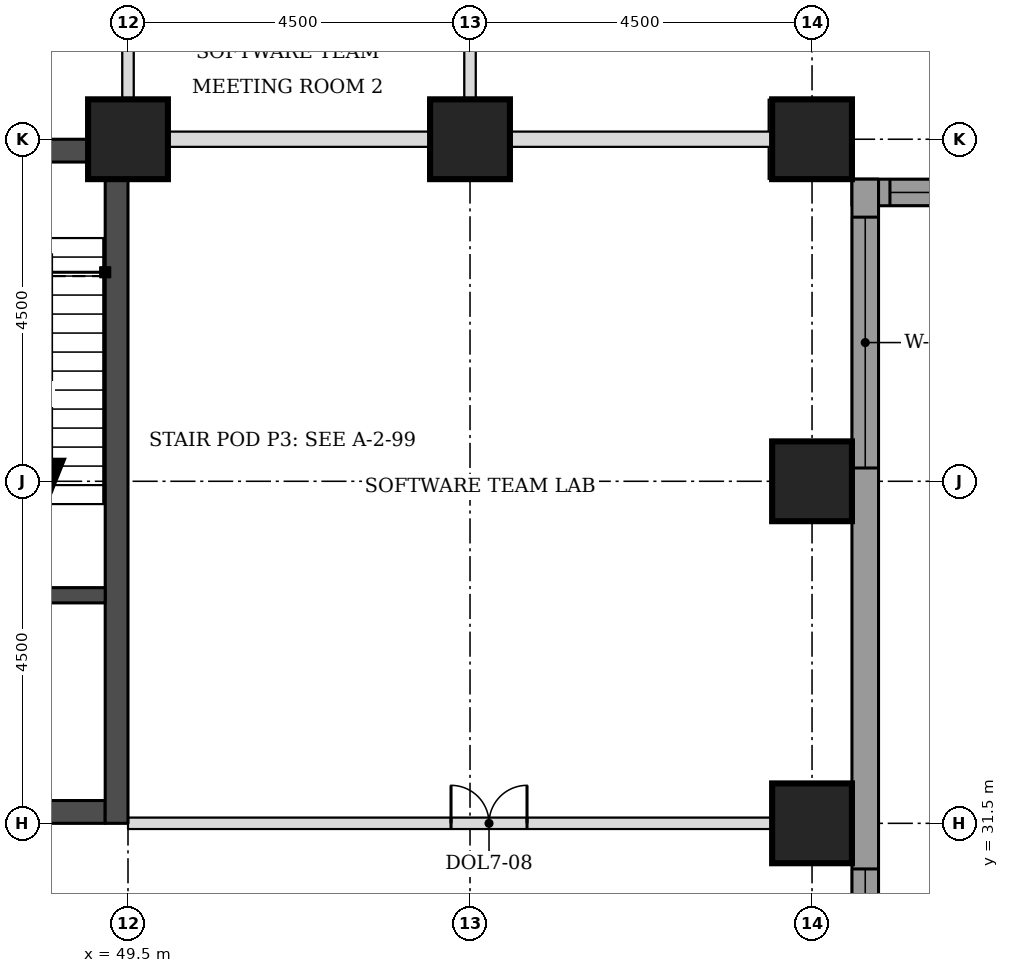
"""IFC4 building model, lengths in metres.
Left out: names, types, materials, properties, quantities, classifications, styles, units other than length and angle.
Written with IfcOpenShell. Run it as: python <this file> out.ifc"""

import sys

from ifc_helpers import new_model, si_unit, direction, frame, frame_2d, origin, origin_2d, place, context, subcontext, project, spatial, rectangle, extrude, element, fill, save


model = new_model("IFC4")
c1 = context("Model", 3, precision=1e-05, world=origin(), true_north=direction((0.0, 1.0)))
c2 = subcontext(c1, "Body", "Model", "MODEL_VIEW")
j1 = project(units=[si_unit("LENGTHUNIT", "METRE"), si_unit("PLANEANGLEUNIT", "RADIAN")], contexts=[c1])
p1 = place(None, origin())
s1 = spatial("IfcSite", under=j1, at=p1, CompositionType="ELEMENT")
p2 = place(p1, origin())
s2 = spatial("IfcBuilding", under=s1, at=p2, CompositionType="ELEMENT")
p3 = place(p2, frame((0.0, 0.0, 130.7)))
s3 = spatial("IfcBuildingStorey", under=s2, at=p3, CompositionType="ELEMENT", Elevation=130.7)
for number, where, z_axis, x_axis in (
    (1, (58.5, 31.5, 0.0), (0.0, 0.0, 1.0), (1.0, 0.0, 0.0)),
    (2, (58.5, 36.0, 0.0), (0.0, 0.0, 1.0), (1.0, 0.0, 0.0)),
    (3, (49.5, 40.5, 0.0), (0.0, 0.0, 1.0), (1.0, 0.0, 0.0)),
    (4, (54.0, 40.5, 0.0), (0.0, 0.0, 1.0), (1.0, 0.0, 0.0)),
    (5, (58.5, 40.5, 0.0), (0.0, 0.0, 1.0), (1.0, 0.0, 0.0)),
):
    element("IfcColumn", number, at=place(p3, frame(where, z_axis=z_axis, x_axis=x_axis)), inside=s3, PredefinedType="COLUMN", context=c2, shape_type="SweptSolid", body=[
        extrude(rectangle(XDim=1.05, YDim=1.05, at=origin_2d()), origin(), (0.0, 0.0, 1.0), 3.7),
    ])
p4 = place(p3, frame((40.8, 31.65, 0.0), z_axis=(0.0, 0.0, 1.0), x_axis=(1.0, 0.0, 0.0)))
e6 = element("IfcWall", 6, at=p4, inside=s3, PredefinedType="SHEAR", context=c2, shape_type="SweptSolid", body=[
    extrude(rectangle(XDim=8.4, YDim=0.3, at=frame_2d((4.2, 0.0))), origin(), (0.0, 0.0, 1.0), 3.7),
])
p5 = place(p4, frame((5.2, 0.0, 0.0)))
e7 = element("IfcOpeningElement", 7, at=p5, cuts=e6, PredefinedType="OPENING", context=c2, shape_type="SweptSolid", body=[
    extrude(rectangle(XDim=1.0, YDim=2.1, at=frame_2d((0.5, 1.05))), frame((0.0, 0.16, 0.0), z_axis=(0.0, -1.0, 0.0), x_axis=(1.0, 0.0, 0.0)), (0.0, 0.0, 1.0), 0.32),
])
p6 = place(p3, frame((40.8, 40.35, 0.0), z_axis=(0.0, 0.0, 1.0), x_axis=(1.0, 0.0, 0.0)))
e8 = element("IfcWall", 8, at=p6, inside=s3, PredefinedType="SHEAR", context=c2, shape_type="SweptSolid", body=[
    extrude(rectangle(XDim=8.4, YDim=0.3, at=frame_2d((4.2, 0.0))), origin(), (0.0, 0.0, 1.0), 3.7),
])
p7 = place(p6, frame((6.4, 0.0, 0.0)))
e9 = element("IfcOpeningElement", 9, at=p7, cuts=e8, PredefinedType="OPENING", context=c2, shape_type="SweptSolid", body=[
    extrude(rectangle(XDim=1.1, YDim=2.1, at=frame_2d((0.55, 1.05))), frame((0.0, 0.16, 0.0), z_axis=(0.0, -1.0, 0.0), x_axis=(1.0, 0.0, 0.0)), (0.0, 0.0, 1.0), 0.32),
])
p8 = place(p3, frame((49.35, 31.5, 0.0), z_axis=(0.0, 0.0, 1.0), x_axis=(0.0, 1.0, 0.0)))
e10 = element("IfcWall", 10, at=p8, inside=s3, PredefinedType="SHEAR", context=c2, shape_type="SweptSolid", body=[
    extrude(rectangle(XDim=9.0, YDim=0.3, at=frame_2d((4.5, 0.0))), origin(), (0.0, 0.0, 1.0), 3.7),
])
p9 = place(p3, frame((59.025, 39.8, 0.0), z_axis=(0.0, 0.0, 1.0), x_axis=(1.0, 0.0, 0.0)))
e11 = element("IfcWall", 11, at=p9, inside=s3, PredefinedType="STANDARD", context=c2, shape_type="SweptSolid", body=[
    extrude(rectangle(XDim=13.337, YDim=0.35, at=frame_2d((6.669, 0.0))), origin(), (0.0, 0.0, 1.0), 3.525),
])
p10 = place(p9, frame((0.5, 0.0, 0.9)))
e12 = element("IfcOpeningElement", 12, at=p10, cuts=e11, PredefinedType="OPENING", context=c2, shape_type="SweptSolid", body=[
    extrude(rectangle(XDim=3.3, YDim=1.9, at=frame_2d((1.65, 0.95))), frame((0.0, 0.185, 0.0), z_axis=(0.0, -1.0, 0.0), x_axis=(1.0, 0.0, 0.0)), (0.0, 0.0, 1.0), 0.37),
])
p11 = place(p3, frame((59.2, 22.138, 0.0), z_axis=(0.0, 0.0, 1.0), x_axis=(0.0, 1.0, 0.0)))
e13 = element("IfcWall", 13, at=p11, inside=s3, PredefinedType="STANDARD", context=c2, shape_type="SweptSolid", body=[
    extrude(rectangle(XDim=17.837, YDim=0.35, at=frame_2d((8.919, 0.0))), origin(), (0.0, 0.0, 1.0), 3.525),
])
p12 = place(p11, frame((5.462, 0.0, 0.9)))
e14 = element("IfcOpeningElement", 14, at=p12, cuts=e13, PredefinedType="OPENING", context=c2, shape_type="SweptSolid", body=[
    extrude(rectangle(XDim=3.3, YDim=1.9, at=frame_2d((1.65, 0.95))), frame((0.0, 0.185, 0.0), z_axis=(0.0, -1.0, 0.0), x_axis=(1.0, 0.0, 0.0)), (0.0, 0.0, 1.0), 0.37),
])
p13 = place(p11, frame((14.037, 0.0, 0.9)))
e15 = element("IfcOpeningElement", 15, at=p13, cuts=e13, PredefinedType="OPENING", context=c2, shape_type="SweptSolid", body=[
    extrude(rectangle(XDim=3.3, YDim=1.9, at=frame_2d((1.65, 0.95))), frame((0.0, 0.185, 0.0), z_axis=(0.0, -1.0, 0.0), x_axis=(1.0, 0.0, 0.0)), (0.0, 0.0, 1.0), 0.37),
])
p14 = place(p3, frame((49.5, 31.5, 0.0), z_axis=(0.0, 0.0, 1.0), x_axis=(1.0, 0.0, 0.0)))
e16 = element("IfcWall", 16, at=p14, inside=s3, PredefinedType="PARTITIONING", context=c2, shape_type="SweptSolid", body=[
    extrude(rectangle(XDim=9.525, YDim=0.15, at=frame_2d((4.762, 0.0))), origin(), (0.0, 0.0, 1.0), 2.55),
])
p15 = place(p14, frame((4.25, 0.0, 0.0)))
e17 = element("IfcOpeningElement", 17, at=p15, cuts=e16, PredefinedType="OPENING", context=c2, shape_type="SweptSolid", body=[
    extrude(rectangle(XDim=1.0, YDim=2.1, at=frame_2d((0.5, 1.05))), frame((0.0, 0.085, 0.0), z_axis=(0.0, -1.0, 0.0), x_axis=(1.0, 0.0, 0.0)), (0.0, 0.0, 1.0), 0.17),
])
p16 = place(p3, frame((50.015, 40.5, 0.0), z_axis=(0.0, 0.0, 1.0), x_axis=(1.0, 0.0, 0.0)))
e18 = element("IfcWall", 18, at=p16, inside=s3, PredefinedType="PARTITIONING", context=c2, shape_type="SweptSolid", body=[
    extrude(rectangle(XDim=3.46, YDim=0.2, at=frame_2d((1.73, 0.0))), origin(), (0.0, 0.0, 1.0), 2.8),
])
p17 = place(p3, frame((54.495, 40.5, 0.0), z_axis=(0.0, 0.0, 1.0), x_axis=(1.0, 0.0, 0.0)))
e19 = element("IfcWall", 19, at=p17, inside=s3, PredefinedType="PARTITIONING", context=c2, shape_type="SweptSolid", body=[
    extrude(rectangle(XDim=3.48, YDim=0.2, at=frame_2d((1.74, 0.0))), origin(), (0.0, 0.0, 1.0), 2.8),
])
p18 = place(p3, frame((49.5, 41.025, 0.0), z_axis=(0.0, 0.0, 1.0), x_axis=(0.0, 1.0, 0.0)))
e20 = element("IfcWall", 20, at=p18, inside=s3, PredefinedType="PARTITIONING", context=c2, shape_type="SweptSolid", body=[
    extrude(rectangle(XDim=2.475, YDim=0.15, at=frame_2d((1.238, 0.0))), origin(), (0.0, 0.0, 1.0), 3.55),
])
p19 = place(p3, frame((54.0, 41.025, 0.0), z_axis=(0.0, 0.0, 1.0), x_axis=(0.0, 1.0, 0.0)))
e21 = element("IfcWall", 21, at=p19, inside=s3, PredefinedType="PARTITIONING", context=c2, shape_type="SweptSolid", body=[
    extrude(rectangle(XDim=2.475, YDim=0.15, at=frame_2d((1.238, 0.0))), origin(), (0.0, 0.0, 1.0), 3.55),
])
p20 = place(p19, frame((0.8, 0.0, 0.0)))
e22 = element("IfcOpeningElement", 22, at=p20, cuts=e21, PredefinedType="OPENING", context=c2, shape_type="SweptSolid", body=[
    extrude(rectangle(XDim=0.9, YDim=2.1, at=frame_2d((0.45, 1.05))), frame((0.0, 0.085, 0.0), z_axis=(0.0, -1.0, 0.0), x_axis=(1.0, 0.0, 0.0)), (0.0, 0.0, 1.0), 0.17),
])
p21 = place(p3, frame((46.2, 34.5, 0.0), z_axis=(0.0, 0.0, 1.0), x_axis=(1.0, 0.0, 0.0)))
e23 = element("IfcWall", 23, at=p21, inside=s3, PredefinedType="SOLIDWALL", context=c2, shape_type="SweptSolid", body=[
    extrude(rectangle(XDim=3.0, YDim=0.2, at=frame_2d((1.5, 0.0))), origin(), (0.0, 0.0, 1.0), 3.55),
])
p22 = place(p10, origin())
e24 = element("IfcWindow", 24, at=p22, inside=s3, PartitioningType="SINGLE_PANEL", PredefinedType="WINDOW", context=c2, shape_type="SweptSolid", body=[
    extrude(rectangle(XDim=3.3, YDim=1.9, at=frame_2d((1.65, 0.95))), frame((0.0, 0.085, 0.0), z_axis=(0.0, -1.0, 0.0), x_axis=(1.0, 0.0, 0.0)), (0.0, 0.0, 1.0), 0.06),
])
fill(e12, e24)
p23 = place(p12, origin())
e25 = element("IfcWindow", 25, at=p23, inside=s3, PartitioningType="SINGLE_PANEL", PredefinedType="WINDOW", context=c2, shape_type="SweptSolid", body=[
    extrude(rectangle(XDim=3.3, YDim=1.9, at=frame_2d((1.65, 0.95))), frame((0.0, 0.085, 0.0), z_axis=(0.0, -1.0, 0.0), x_axis=(1.0, 0.0, 0.0)), (0.0, 0.0, 1.0), 0.06),
])
fill(e14, e25)
p24 = place(p13, origin())
e26 = element("IfcWindow", 26, at=p24, inside=s3, PartitioningType="SINGLE_PANEL", PredefinedType="WINDOW", context=c2, shape_type="SweptSolid", body=[
    extrude(rectangle(XDim=3.3, YDim=1.9, at=frame_2d((1.65, 0.95))), frame((0.0, 0.085, 0.0), z_axis=(0.0, -1.0, 0.0), x_axis=(1.0, 0.0, 0.0)), (0.0, 0.0, 1.0), 0.06),
])
fill(e15, e26)
p25 = place(p15, origin())
e27 = element("IfcDoor", 27, at=p25, inside=s3, OperationType="DOUBLE_DOOR_SINGLE_SWING", PredefinedType="DOOR", context=c2, shape_type="SweptSolid", body=[
    extrude(rectangle(XDim=1.0, YDim=2.1, at=frame_2d((0.5, 1.05))), frame((0.0, 0.025, 0.0), z_axis=(0.0, -1.0, 0.0), x_axis=(1.0, 0.0, 0.0)), (0.0, 0.0, 1.0), 0.05),
])
fill(e17, e27)
save(model, sys.argv[1])
